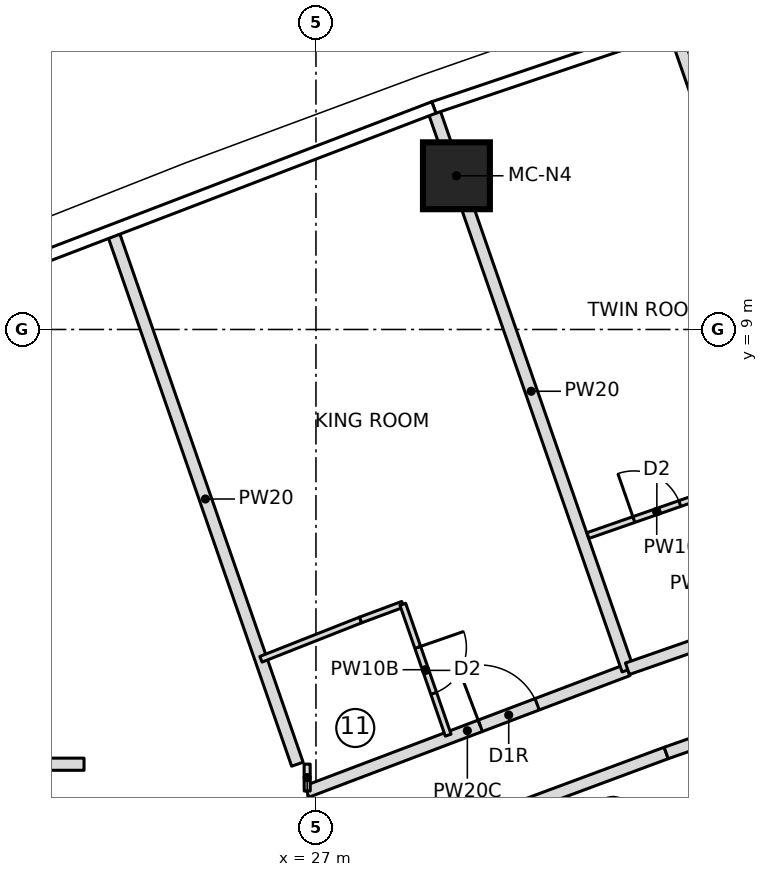
"""IFC4 building model, lengths in metres.
Left out: names, types, materials, properties, quantities, classifications, styles, units other than length and angle.
Written with IfcOpenShell. Run it as: python <this file> out.ifc"""

import sys

from ifc_helpers import new_model, si_unit, direction, frame, frame_2d, origin, origin_2d, place, context, subcontext, project, spatial, rectangle, extrude, element, fill, save


model = new_model("IFC4")
c1 = context("Model", 3, precision=1e-05, world=origin(), true_north=direction((0.0, 1.0)))
c2 = subcontext(c1, "Body", "Model", "MODEL_VIEW")
j1 = project(units=[si_unit("LENGTHUNIT", "METRE"), si_unit("PLANEANGLEUNIT", "RADIAN")], contexts=[c1])
p1 = place(None, origin())
s1 = spatial("IfcSite", under=j1, at=p1, CompositionType="ELEMENT")
p2 = place(p1, origin())
s2 = spatial("IfcBuilding", under=s1, at=p2, CompositionType="ELEMENT")
p3 = place(p2, frame((0.0, 0.0, 289.2)))
s3 = spatial("IfcBuildingStorey", under=s2, at=p3, CompositionType="ELEMENT", Elevation=289.2)
p4 = place(p3, frame((29.31, 11.528, 0.0), z_axis=(0.0, 0.0, 1.0), x_axis=(1.0, 0.0, 0.0)))
e1 = element("IfcColumn", 1, at=p4, inside=s3, PredefinedType="COLUMN", context=c2, shape_type="SweptSolid", body=[
    extrude(rectangle(XDim=1.1, YDim=1.1, at=origin_2d()), origin(), (0.0, 0.0, 1.0), 3.55),
])
p5 = place(p3, frame((7.287, 1.85, 0.0), z_axis=(0.0, 0.0, 1.0), x_axis=(1.0, 0.0, 0.0)))
e2 = element("IfcWall", 2, at=p5, inside=s3, PredefinedType="PARTITIONING", context=c2, shape_type="SweptSolid", body=[
    extrude(rectangle(XDim=15.899, YDim=0.2, at=frame_2d((7.949, 0.0))), origin(), (0.0, 0.0, 1.0), 3.25),
])
p6 = place(p5, frame((7.624, 0.0, 0.0)))
e3 = element("IfcOpeningElement", 3, at=p6, cuts=e2, PredefinedType="OPENING", context=c2, shape_type="SweptSolid", body=[
    extrude(rectangle(XDim=1.0, YDim=2.1, at=frame_2d((0.5, 1.05))), frame((0.0, 0.11, 0.0), z_axis=(0.0, -1.0, 0.0), x_axis=(1.0, 0.0, 0.0)), (0.0, 0.0, 1.0), 0.22),
])
p7 = place(p3, frame((26.694, 1.85, 0.0), z_axis=(0.0, 0.0, 1.0), x_axis=(-0.327714422317, 0.944776829418, 0.0)))
e4 = element("IfcWall", 4, at=p7, inside=s3, PredefinedType="PARTITIONING", context=c2, shape_type="SweptSolid", body=[
    extrude(rectangle(XDim=9.233, YDim=0.2, at=frame_2d((4.617, 0.0))), origin(), (0.0, 0.0, 1.0), 3.25),
])
p8 = place(p3, frame((26.85, 1.401, 0.0), z_axis=(0.0, 0.0, 1.0), x_axis=(0.935181367748, 0.354169181912, 0.0)))
e5 = element("IfcWall", 5, at=p8, inside=s3, PredefinedType="PARTITIONING", context=c2, shape_type="SweptSolid", body=[
    extrude(rectangle(XDim=5.645, YDim=0.2, at=frame_2d((2.823, 0.0))), origin(), (0.0, 0.0, 1.0), 3.25),
])
p9 = place(p8, frame((3.05, 0.0, 0.0)))
e6 = element("IfcOpeningElement", 6, at=p9, cuts=e5, PredefinedType="OPENING", context=c2, shape_type="SweptSolid", body=[
    extrude(rectangle(XDim=1.0, YDim=2.1, at=frame_2d((0.5, 1.05))), frame((0.0, 0.11, 0.0), z_axis=(0.0, -1.0, 0.0), x_axis=(1.0, 0.0, 0.0)), (0.0, 0.0, 1.0), 0.22),
])
p10 = place(p3, frame((26.096, 3.576, 0.0), z_axis=(0.0, 0.0, 1.0), x_axis=(0.930254925629, 0.366913850028, 0.0)))
e7 = element("IfcWall", 7, at=p10, inside=s3, PredefinedType="PARTITIONING", context=c2, shape_type="SweptSolid", body=[
    extrude(rectangle(XDim=1.76, YDim=0.1, at=frame_2d((0.88, 0.0))), origin(), (0.0, 0.0, 1.0), 3.25),
])
p11 = place(p3, frame((27.733, 4.222, 0.0), z_axis=(0.0, 0.0, 1.0), x_axis=(0.937514267289, 0.347946833049, 0.0)))
e8 = element("IfcWall", 8, at=p11, inside=s3, PredefinedType="PARTITIONING", context=c2, shape_type="SweptSolid", body=[
    extrude(rectangle(XDim=0.742, YDim=0.1, at=frame_2d((0.371, 0.0))), origin(), (0.0, 0.0, 1.0), 3.25),
])
p12 = place(p3, frame((28.428, 4.48, 0.0), z_axis=(0.0, 0.0, 1.0), x_axis=(0.327718024288, -0.944775579996, 0.0)))
e9 = element("IfcWall", 9, at=p12, inside=s3, PredefinedType="PARTITIONING", context=c2, shape_type="SweptSolid", body=[
    extrude(rectangle(XDim=2.277, YDim=0.1, at=frame_2d((1.139, 0.0))), origin(), (0.0, 0.0, 1.0), 3.25),
])
p13 = place(p12, frame((0.75, 0.0, 0.0)))
e10 = element("IfcOpeningElement", 10, at=p13, cuts=e9, PredefinedType="OPENING", context=c2, shape_type="SweptSolid", body=[
    extrude(rectangle(XDim=0.8, YDim=2.1, at=frame_2d((0.4, 1.05))), frame((0.0, 0.06, 0.0), z_axis=(0.0, -1.0, 0.0), x_axis=(1.0, 0.0, 0.0)), (0.0, 0.0, 1.0), 0.12),
])
p14 = place(p3, frame((32.129, 3.401, 0.0), z_axis=(0.0, 0.0, 1.0), x_axis=(-0.327724115377, 0.944773467134, 0.0)))
e11 = element("IfcWall", 11, at=p14, inside=s3, PredefinedType="PARTITIONING", context=c2, shape_type="SweptSolid", body=[
    extrude(rectangle(XDim=9.702, YDim=0.2, at=frame_2d((4.851, 0.0))), origin(), (0.0, 0.0, 1.0), 3.25),
])
p15 = place(p3, frame((36.064, 4.794, 0.0), z_axis=(0.0, 0.0, 1.0), x_axis=(-0.944236129554, -0.329269086986, 0.0)))
e12 = element("IfcWall", 12, at=p15, inside=s3, PredefinedType="PARTITIONING", context=c2, shape_type="SweptSolid", body=[
    extrude(rectangle(XDim=4.174, YDim=0.2, at=frame_2d((2.087, 0.0))), origin(), (0.0, 0.0, 1.0), 3.25),
])
p16 = place(p15, frame((0.35, 0.0, 0.0)))
e13 = element("IfcOpeningElement", 13, at=p16, cuts=e12, PredefinedType="OPENING", context=c2, shape_type="SweptSolid", body=[
    extrude(rectangle(XDim=1.0, YDim=2.1, at=frame_2d((0.5, 1.05))), frame((0.0, 0.11, 0.0), z_axis=(0.0, -1.0, 0.0), x_axis=(1.0, 0.0, 0.0)), (0.0, 0.0, 1.0), 0.22),
])
p17 = place(p3, frame((31.473, 5.611, 0.0), z_axis=(0.0, 0.0, 1.0), x_axis=(0.944305532659, 0.329069994059, 0.0)))
e14 = element("IfcWall", 14, at=p17, inside=s3, PredefinedType="PARTITIONING", context=c2, shape_type="SweptSolid", body=[
    extrude(rectangle(XDim=2.396, YDim=0.1, at=frame_2d((1.198, 0.0))), origin(), (0.0, 0.0, 1.0), 3.25),
])
p18 = place(p17, frame((0.8, 0.0, 0.0)))
e15 = element("IfcOpeningElement", 15, at=p18, cuts=e14, PredefinedType="OPENING", context=c2, shape_type="SweptSolid", body=[
    extrude(rectangle(XDim=0.8, YDim=2.1, at=frame_2d((0.4, 1.05))), frame((0.0, 0.06, 0.0), z_axis=(0.0, -1.0, 0.0), x_axis=(1.0, 0.0, 0.0)), (0.0, 0.0, 1.0), 0.12),
])
p19 = place(p3, frame((36.071, 4.775, 0.0), z_axis=(0.0, 0.0, 1.0), x_axis=(-0.327725028322, 0.94477315045, 0.0)))
e16 = element("IfcWall", 16, at=p19, inside=s3, PredefinedType="PARTITIONING", context=c2, shape_type="SweptSolid", body=[
    extrude(rectangle(XDim=9.702, YDim=0.2, at=frame_2d((4.851, 0.0))), origin(), (0.0, 0.0, 1.0), 3.25),
])
p20 = place(p3, frame((30.385, 1.153, 0.0), z_axis=(0.0, 0.0, 1.0), x_axis=(0.937461225735, 0.348089715797, 0.0)))
e17 = element("IfcWall", 17, at=p20, inside=s3, PredefinedType="PARTITIONING", context=c2, shape_type="SweptSolid", body=[
    extrude(rectangle(XDim=2.533, YDim=0.2, at=frame_2d((1.266, 0.0))), origin(), (0.0, 0.0, 1.0), 3.25),
])
p21 = place(p3, frame((32.76, 2.035, 0.0), z_axis=(0.0, 0.0, 1.0), x_axis=(0.944322693955, 0.329020743543, 0.0)))
e18 = element("IfcWall", 18, at=p21, inside=s3, PredefinedType="PARTITIONING", context=c2, shape_type="SweptSolid", body=[
    extrude(rectangle(XDim=0.663, YDim=0.2, at=frame_2d((0.331, 0.0))), origin(), (0.0, 0.0, 1.0), 3.25),
])
p22 = place(p3, frame((26.856, 1.409, 0.0), z_axis=(0.0, 0.0, 1.0), x_axis=(-0.003863105832, 0.999992538179, 0.0)))
e19 = element("IfcWall", 19, at=p22, inside=s3, PredefinedType="PARTITIONING", context=c2, shape_type="SweptSolid", body=[
    extrude(rectangle(XDim=0.442, YDim=0.1, at=frame_2d((0.221, 0.0))), origin(), (0.0, 0.0, 1.0), 3.25),
])
p23 = place(p13, origin())
e20 = element("IfcDoor", 20, at=p23, inside=s3, OperationType="SINGLE_SWING_LEFT", PredefinedType="DOOR", context=c2, shape_type="SweptSolid", body=[
    extrude(rectangle(XDim=0.8, YDim=2.1, at=frame_2d((0.4, 1.05))), frame((0.0, 0.025, 0.0), z_axis=(0.0, -1.0, 0.0), x_axis=(1.0, 0.0, 0.0)), (0.0, 0.0, 1.0), 0.05),
])
fill(e10, e20)
p24 = place(p9, origin())
e21 = element("IfcDoor", 21, at=p24, inside=s3, OperationType="SINGLE_SWING_RIGHT", PredefinedType="DOOR", context=c2, shape_type="SweptSolid", body=[
    extrude(rectangle(XDim=1.0, YDim=2.1, at=frame_2d((0.5, 1.05))), frame((0.0, 0.025, 0.0), z_axis=(0.0, -1.0, 0.0), x_axis=(1.0, 0.0, 0.0)), (0.0, 0.0, 1.0), 0.05),
])
fill(e6, e21)
p25 = place(p18, origin())
e22 = element("IfcDoor", 22, at=p25, inside=s3, OperationType="SINGLE_SWING_LEFT", PredefinedType="DOOR", context=c2, shape_type="SweptSolid", body=[
    extrude(rectangle(XDim=0.8, YDim=2.1, at=frame_2d((0.4, 1.05))), frame((0.0, 0.025, 0.0), z_axis=(0.0, -1.0, 0.0), x_axis=(1.0, 0.0, 0.0)), (0.0, 0.0, 1.0), 0.05),
])
fill(e15, e22)
save(model, sys.argv[1])
